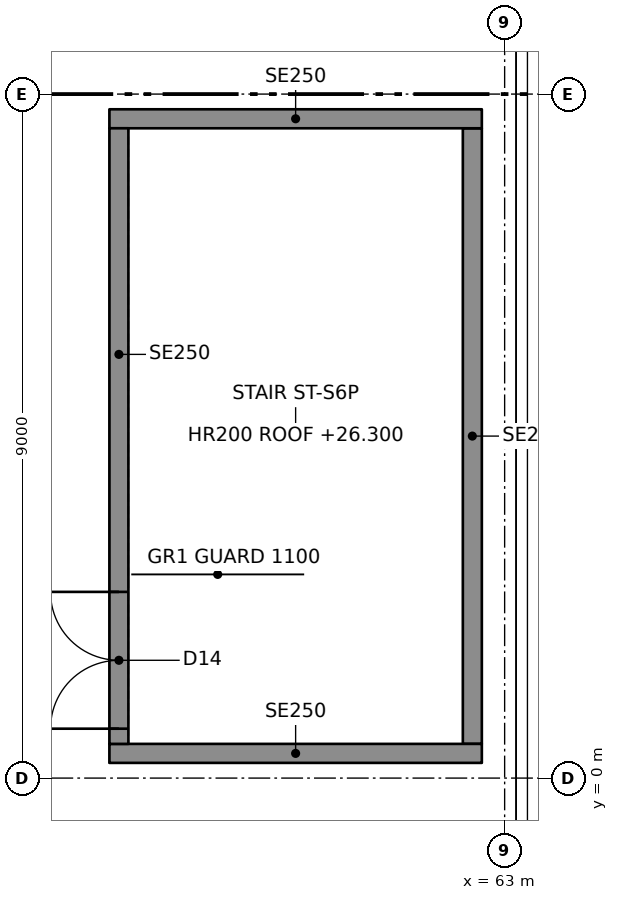
"""IFC4 building model, lengths in metres.
Left out: names, types, materials, properties, quantities, classifications, styles, units other than length and angle.
Written with IfcOpenShell. Run it as: python <this file> out.ifc"""

import sys

from ifc_helpers import new_model, si_unit, direction, frame, frame_2d, origin, place, context, subcontext, project, spatial, rectangle, extrude, element, fill, save


model = new_model("IFC4")
c1 = context("Model", 3, precision=1e-05, world=origin(), true_north=direction((0.0, 1.0)))
c2 = subcontext(c1, "Body", "Model", "MODEL_VIEW")
j1 = project(units=[si_unit("LENGTHUNIT", "METRE"), si_unit("PLANEANGLEUNIT", "RADIAN")], contexts=[c1])
p1 = place(None, origin())
s1 = spatial("IfcSite", under=j1, at=p1, CompositionType="ELEMENT")
p2 = place(p1, origin())
s2 = spatial("IfcBuilding", under=s1, at=p2, CompositionType="ELEMENT")
p3 = place(p2, frame((0.0, 0.0, 23.0)))
s3 = spatial("IfcBuildingStorey", under=s2, at=p3, CompositionType="ELEMENT", Elevation=23.0)
for number, where, z_axis, x_axis in (
    (1, (57.8, 0.325, 0.0), (0.0, 0.0, 1.0), (1.0, 0.0, 0.0)),
    (2, (57.8, 8.675, 0.0), (0.0, 0.0, 1.0), (1.0, 0.0, 0.0)),
):
    element("IfcWall", number, at=place(p3, frame(where, z_axis=z_axis, x_axis=x_axis)), inside=s3, PredefinedType="SOLIDWALL", context=c2, shape_type="SweptSolid", body=[
        extrude(rectangle(XDim=4.9, YDim=0.25, at=frame_2d((2.45, 0.0))), origin(), (0.0, 0.0, 1.0), 3.1),
    ])
p4 = place(p3, frame((57.925, 0.45, 0.0), z_axis=(0.0, 0.0, 1.0), x_axis=(0.0, 1.0, 0.0)))
e3 = element("IfcWall", 3, at=p4, inside=s3, PredefinedType="SOLIDWALL", context=c2, shape_type="SweptSolid", body=[
    extrude(rectangle(XDim=8.1, YDim=0.25, at=frame_2d((4.05, 0.0))), origin(), (0.0, 0.0, 1.0), 3.1),
])
p5 = place(p4, frame((0.2, 0.0, 0.0)))
e4 = element("IfcOpeningElement", 4, at=p5, cuts=e3, PredefinedType="OPENING", context=c2, shape_type="SweptSolid", body=[
    extrude(rectangle(XDim=1.8, YDim=2.1, at=frame_2d((0.9, 1.05))), frame((0.0, 0.135, 0.0), z_axis=(0.0, -1.0, 0.0), x_axis=(1.0, 0.0, 0.0)), (0.0, 0.0, 1.0), 0.27),
])
p6 = place(p3, frame((62.575, 0.45, 0.0), z_axis=(0.0, 0.0, 1.0), x_axis=(0.0, 1.0, 0.0)))
e5 = element("IfcWall", 5, at=p6, inside=s3, PredefinedType="SOLIDWALL", context=c2, shape_type="SweptSolid", body=[
    extrude(rectangle(XDim=8.1, YDim=0.25, at=frame_2d((4.05, 0.0))), origin(), (0.0, 0.0, 1.0), 3.1),
])
p7 = place(p5, origin())
e6 = element("IfcDoor", 6, at=p7, inside=s3, OperationType="DOUBLE_DOOR_SINGLE_SWING", PredefinedType="DOOR", context=c2, shape_type="SweptSolid", body=[
    extrude(rectangle(XDim=1.8, YDim=2.1, at=frame_2d((0.9, 1.05))), frame((0.0, 0.025, 0.0), z_axis=(0.0, -1.0, 0.0), x_axis=(1.0, 0.0, 0.0)), (0.0, 0.0, 1.0), 0.05),
])
fill(e4, e6)
save(model, sys.argv[1])
